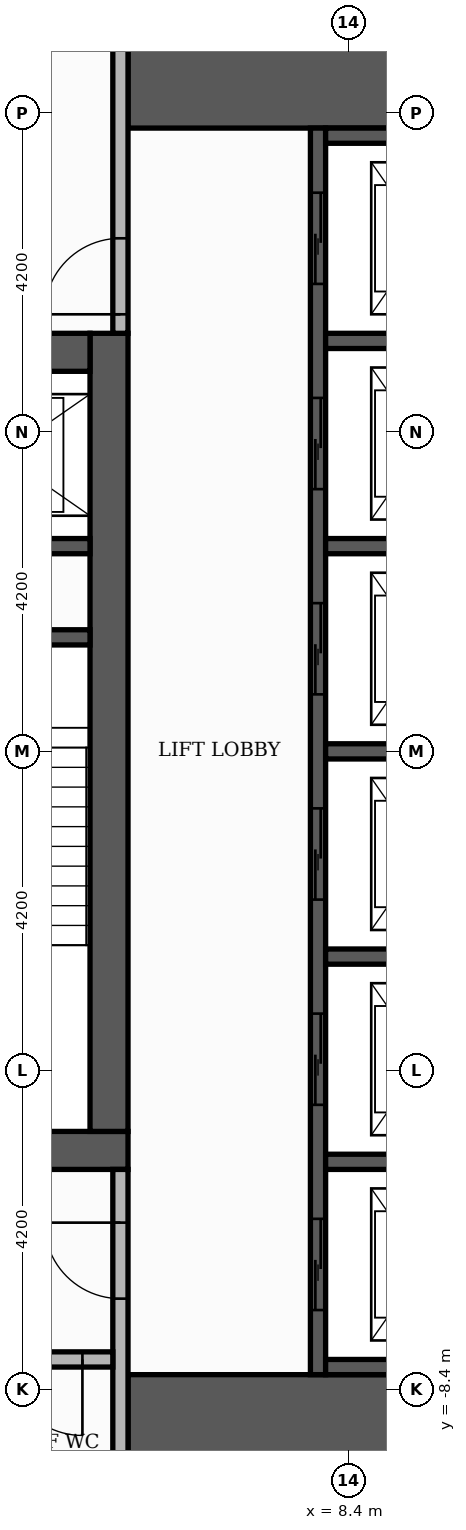
"""IFC4 building model, lengths in metres.
Left out: names, types, materials, properties, quantities, classifications, styles, units other than length and angle.
Written with IfcOpenShell. Run it as: python <this file> out.ifc"""

import sys

from ifc_helpers import new_model, si_unit, direction, frame, frame_2d, origin, place, context, subcontext, project, spatial, rectangle, extrude, element, fill, save


model = new_model("IFC4")
c1 = context("Model", 3, precision=1e-05, world=origin(), true_north=direction((0.0, 1.0)))
c2 = subcontext(c1, "Body", "Model", "MODEL_VIEW")
j1 = project(units=[si_unit("LENGTHUNIT", "METRE"), si_unit("PLANEANGLEUNIT", "RADIAN")], contexts=[c1])
p1 = place(None, origin())
s1 = spatial("IfcSite", under=j1, at=p1, CompositionType="ELEMENT")
p2 = place(p1, origin())
s2 = spatial("IfcBuilding", under=s1, at=p2, CompositionType="ELEMENT")
p3 = place(p2, frame((0.0, 0.0, 157.2)))
s3 = spatial("IfcBuildingStorey", under=s2, at=p3, CompositionType="ELEMENT", Elevation=157.2)
p4 = place(p3, frame((-5.5, -5.25, 0.0), z_axis=(0.0, 0.0, 1.0), x_axis=(1.0, 0.0, 0.0)))
e1 = element("IfcWall", 1, at=p4, inside=s3, PredefinedType="SHEAR", context=c2, shape_type="SweptSolid", body=[
    extrude(rectangle(XDim=11.0, YDim=0.5, at=frame_2d((5.5, 0.0))), origin(), (0.0, 0.0, 1.0), 3.48),
])
p5 = place(p4, frame((4.9, 0.0, 0.0)))
e2 = element("IfcOpeningElement", 2, at=p5, cuts=e1, PredefinedType="OPENING", context=c2, shape_type="SweptSolid", body=[
    extrude(rectangle(XDim=1.2, YDim=2.1, at=frame_2d((0.6, 1.05))), frame((0.0, 0.26, 0.0), z_axis=(0.0, -1.0, 0.0), x_axis=(1.0, 0.0, 0.0)), (0.0, 0.0, 1.0), 0.52),
])
p6 = place(p3, frame((5.25, -5.0, 0.0), z_axis=(0.0, 0.0, 1.0), x_axis=(0.0, 1.0, 0.0)))
e3 = element("IfcWall", 3, at=p6, inside=s3, PredefinedType="SHEAR", context=c2, shape_type="SweptSolid", body=[
    extrude(rectangle(XDim=10.5, YDim=0.5, at=frame_2d((5.25, 0.0))), origin(), (0.0, 0.0, 1.0), 3.48),
])
p7 = place(p3, frame((-5.0, 5.25, 0.0), z_axis=(0.0, 0.0, 1.0), x_axis=(1.0, 0.0, 0.0)))
e4 = element("IfcWall", 4, at=p7, inside=s3, PredefinedType="SHEAR", context=c2, shape_type="SweptSolid", body=[
    extrude(rectangle(XDim=10.0, YDim=0.5, at=frame_2d((5.0, 0.0))), origin(), (0.0, 0.0, 1.0), 3.48),
])
p8 = place(p7, frame((4.4, 0.0, 0.0)))
e5 = element("IfcOpeningElement", 5, at=p8, cuts=e4, PredefinedType="OPENING", context=c2, shape_type="SweptSolid", body=[
    extrude(rectangle(XDim=1.2, YDim=2.1, at=frame_2d((0.6, 1.05))), frame((0.0, 0.26, 0.0), z_axis=(0.0, -1.0, 0.0), x_axis=(1.0, 0.0, 0.0)), (0.0, 0.0, 1.0), 0.52),
])
for number, where, z_axis, x_axis in (
    (6, (5.5, -9.15, 0.0), (0.0, 0.0, 1.0), (1.0, 0.0, 0.0)),
    (7, (5.5, 9.15, 0.0), (0.0, 0.0, 1.0), (1.0, 0.0, 0.0)),
):
    element("IfcWall", number, at=place(p3, frame(where, z_axis=z_axis, x_axis=x_axis)), inside=s3, PredefinedType="SHEAR", context=c2, shape_type="SweptSolid", body=[
        extrude(rectangle(XDim=4.6, YDim=1.9, at=frame_2d((2.3, 0.0))), origin(), (0.0, 0.0, 1.0), 3.48),
    ])
p9 = place(p3, frame((2.15, 1.5, 0.0), z_axis=(0.0, 0.0, 1.0), x_axis=(1.0, 0.0, 0.0)))
e8 = element("IfcWall", 8, at=p9, inside=s3, PredefinedType="SHEAR", context=c2, shape_type="SweptSolid", body=[
    extrude(rectangle(XDim=2.85, YDim=0.2, at=frame_2d((1.425, 0.0))), origin(), (0.0, 0.0, 1.0), 3.48),
])
p10 = place(p3, frame((8.0, -8.2, 0.0), z_axis=(0.0, 0.0, 1.0), x_axis=(0.0, 1.0, 0.0)))
e9 = element("IfcWall", 9, at=p10, inside=s3, PredefinedType="SHEAR", context=c2, shape_type="SweptSolid", body=[
    extrude(rectangle(XDim=16.4, YDim=0.2, at=frame_2d((8.2, 0.0))), origin(), (0.0, 0.0, 1.0), 3.48),
])
p11 = place(p10, frame((0.85, 0.0, 0.0)))
e10 = element("IfcOpeningElement", 10, at=p11, cuts=e9, PredefinedType="OPENING", context=c2, shape_type="SweptSolid", body=[
    extrude(rectangle(XDim=1.2, YDim=2.1, at=frame_2d((0.6, 1.05))), frame((0.0, 0.11, 0.0), z_axis=(0.0, -1.0, 0.0), x_axis=(1.0, 0.0, 0.0)), (0.0, 0.0, 1.0), 0.22),
])
p12 = place(p10, frame((3.55, 0.0, 0.0)))
e11 = element("IfcOpeningElement", 11, at=p12, cuts=e9, PredefinedType="OPENING", context=c2, shape_type="SweptSolid", body=[
    extrude(rectangle(XDim=1.2, YDim=2.1, at=frame_2d((0.6, 1.05))), frame((0.0, 0.11, 0.0), z_axis=(0.0, -1.0, 0.0), x_axis=(1.0, 0.0, 0.0)), (0.0, 0.0, 1.0), 0.22),
])
p13 = place(p10, frame((6.25, 0.0, 0.0)))
e12 = element("IfcOpeningElement", 12, at=p13, cuts=e9, PredefinedType="OPENING", context=c2, shape_type="SweptSolid", body=[
    extrude(rectangle(XDim=1.2, YDim=2.1, at=frame_2d((0.6, 1.05))), frame((0.0, 0.11, 0.0), z_axis=(0.0, -1.0, 0.0), x_axis=(1.0, 0.0, 0.0)), (0.0, 0.0, 1.0), 0.22),
])
p14 = place(p10, frame((8.95, 0.0, 0.0)))
e13 = element("IfcOpeningElement", 13, at=p14, cuts=e9, PredefinedType="OPENING", context=c2, shape_type="SweptSolid", body=[
    extrude(rectangle(XDim=1.2, YDim=2.1, at=frame_2d((0.6, 1.05))), frame((0.0, 0.11, 0.0), z_axis=(0.0, -1.0, 0.0), x_axis=(1.0, 0.0, 0.0)), (0.0, 0.0, 1.0), 0.22),
])
p15 = place(p10, frame((11.65, 0.0, 0.0)))
e14 = element("IfcOpeningElement", 14, at=p15, cuts=e9, PredefinedType="OPENING", context=c2, shape_type="SweptSolid", body=[
    extrude(rectangle(XDim=1.2, YDim=2.1, at=frame_2d((0.6, 1.05))), frame((0.0, 0.11, 0.0), z_axis=(0.0, -1.0, 0.0), x_axis=(1.0, 0.0, 0.0)), (0.0, 0.0, 1.0), 0.22),
])
p16 = place(p10, frame((14.35, 0.0, 0.0)))
e15 = element("IfcOpeningElement", 15, at=p16, cuts=e9, PredefinedType="OPENING", context=c2, shape_type="SweptSolid", body=[
    extrude(rectangle(XDim=1.2, YDim=2.1, at=frame_2d((0.6, 1.05))), frame((0.0, 0.11, 0.0), z_axis=(0.0, -1.0, 0.0), x_axis=(1.0, 0.0, 0.0)), (0.0, 0.0, 1.0), 0.22),
])
for number, where, z_axis, x_axis in (
    (16, (8.1, -8.1, 0.0), (0.0, 0.0, 1.0), (1.0, 0.0, 0.0)),
    (17, (8.1, -5.4, 0.0), (0.0, 0.0, 1.0), (1.0, 0.0, 0.0)),
    (18, (8.1, -2.7, 0.0), (0.0, 0.0, 1.0), (1.0, 0.0, 0.0)),
    (19, (8.1, 0.0, 0.0), (0.0, 0.0, 1.0), (1.0, 0.0, 0.0)),
):
    element("IfcWall", number, at=place(p3, frame(where, z_axis=z_axis, x_axis=x_axis)), inside=s3, PredefinedType="SHEAR", context=c2, shape_type="SweptSolid", body=[
        extrude(rectangle(XDim=2.0, YDim=0.2, at=frame_2d((1.0, 0.0))), origin(), (0.0, 0.0, 1.0), 3.48),
    ])
p17 = place(p3, frame((2.15, 2.7, 0.0), z_axis=(0.0, 0.0, 1.0), x_axis=(1.0, 0.0, 0.0)))
e20 = element("IfcWall", 20, at=p17, inside=s3, PredefinedType="SHEAR", context=c2, shape_type="SweptSolid", body=[
    extrude(rectangle(XDim=2.85, YDim=0.2, at=frame_2d((1.425, 0.0))), origin(), (0.0, 0.0, 1.0), 3.48),
])
for number, where, z_axis, x_axis in (
    (21, (8.1, 2.7, 0.0), (0.0, 0.0, 1.0), (1.0, 0.0, 0.0)),
    (22, (8.1, 5.4, 0.0), (0.0, 0.0, 1.0), (1.0, 0.0, 0.0)),
    (23, (8.1, 8.1, 0.0), (0.0, 0.0, 1.0), (1.0, 0.0, 0.0)),
):
    element("IfcWall", number, at=place(p3, frame(where, z_axis=z_axis, x_axis=x_axis)), inside=s3, PredefinedType="SHEAR", context=c2, shape_type="SweptSolid", body=[
        extrude(rectangle(XDim=2.0, YDim=0.2, at=frame_2d((1.0, 0.0))), origin(), (0.0, 0.0, 1.0), 3.48),
    ])
p18 = place(p3, frame((5.4, -10.1, 0.0), z_axis=(0.0, 0.0, 1.0), x_axis=(0.0, 1.0, 0.0)))
e24 = element("IfcWall", 24, at=p18, inside=s3, PredefinedType="PARTITIONING", context=c2, shape_type="SweptSolid", body=[
    extrude(rectangle(XDim=4.6, YDim=0.2, at=frame_2d((2.3, 0.0))), origin(), (0.0, 0.0, 1.0), 3.48),
])
p19 = place(p18, frame((2.9, 0.0, 0.0)))
e25 = element("IfcOpeningElement", 25, at=p19, cuts=e24, PredefinedType="OPENING", context=c2, shape_type="SweptSolid", body=[
    extrude(rectangle(XDim=1.0, YDim=2.1, at=frame_2d((0.5, 1.05))), frame((0.0, 0.11, 0.0), z_axis=(0.0, -1.0, 0.0), x_axis=(1.0, 0.0, 0.0)), (0.0, 0.0, 1.0), 0.22),
])
p20 = place(p3, frame((3.55, -8.0, 0.0), z_axis=(0.0, 0.0, 1.0), x_axis=(1.0, 0.0, 0.0)))
e26 = element("IfcWall", 26, at=p20, inside=s3, PredefinedType="PARTITIONING", context=c2, shape_type="SweptSolid", body=[
    extrude(rectangle(XDim=1.75, YDim=0.2, at=frame_2d((0.875, 0.0))), origin(), (0.0, 0.0, 1.0), 3.48),
])
p21 = place(p20, frame((0.35, 0.0, 0.0)))
e27 = element("IfcOpeningElement", 27, at=p21, cuts=e26, PredefinedType="OPENING", context=c2, shape_type="SweptSolid", body=[
    extrude(rectangle(XDim=1.0, YDim=2.1, at=frame_2d((0.5, 1.05))), frame((0.0, 0.11, 0.0), z_axis=(0.0, -1.0, 0.0), x_axis=(1.0, 0.0, 0.0)), (0.0, 0.0, 1.0), 0.22),
])
p22 = place(p3, frame((5.4, 5.5, 0.0), z_axis=(0.0, 0.0, 1.0), x_axis=(0.0, 1.0, 0.0)))
e28 = element("IfcWall", 28, at=p22, inside=s3, PredefinedType="PARTITIONING", context=c2, shape_type="SweptSolid", body=[
    extrude(rectangle(XDim=4.6, YDim=0.2, at=frame_2d((2.3, 0.0))), origin(), (0.0, 0.0, 1.0), 3.48),
])
p23 = place(p22, frame((0.25, 0.0, 0.0)))
e29 = element("IfcOpeningElement", 29, at=p23, cuts=e28, PredefinedType="OPENING", context=c2, shape_type="SweptSolid", body=[
    extrude(rectangle(XDim=1.0, YDim=2.1, at=frame_2d((0.5, 1.05))), frame((0.0, 0.11, 0.0), z_axis=(0.0, -1.0, 0.0), x_axis=(1.0, 0.0, 0.0)), (0.0, 0.0, 1.0), 0.22),
])
p24 = place(p11, origin())
e30 = element("IfcDoor", 30, at=p24, inside=s3, OperationType="SLIDING_TO_LEFT", PredefinedType="DOOR", context=c2, shape_type="SweptSolid", body=[
    extrude(rectangle(XDim=1.2, YDim=2.1, at=frame_2d((0.6, 1.05))), frame((0.0, 0.025, 0.0), z_axis=(0.0, -1.0, 0.0), x_axis=(1.0, 0.0, 0.0)), (0.0, 0.0, 1.0), 0.05),
])
fill(e10, e30)
p25 = place(p12, origin())
e31 = element("IfcDoor", 31, at=p25, inside=s3, OperationType="SLIDING_TO_LEFT", PredefinedType="DOOR", context=c2, shape_type="SweptSolid", body=[
    extrude(rectangle(XDim=1.2, YDim=2.1, at=frame_2d((0.6, 1.05))), frame((0.0, 0.025, 0.0), z_axis=(0.0, -1.0, 0.0), x_axis=(1.0, 0.0, 0.0)), (0.0, 0.0, 1.0), 0.05),
])
fill(e11, e31)
p26 = place(p13, origin())
e32 = element("IfcDoor", 32, at=p26, inside=s3, OperationType="SLIDING_TO_LEFT", PredefinedType="DOOR", context=c2, shape_type="SweptSolid", body=[
    extrude(rectangle(XDim=1.2, YDim=2.1, at=frame_2d((0.6, 1.05))), frame((0.0, 0.025, 0.0), z_axis=(0.0, -1.0, 0.0), x_axis=(1.0, 0.0, 0.0)), (0.0, 0.0, 1.0), 0.05),
])
fill(e12, e32)
p27 = place(p14, origin())
e33 = element("IfcDoor", 33, at=p27, inside=s3, OperationType="SLIDING_TO_LEFT", PredefinedType="DOOR", context=c2, shape_type="SweptSolid", body=[
    extrude(rectangle(XDim=1.2, YDim=2.1, at=frame_2d((0.6, 1.05))), frame((0.0, 0.025, 0.0), z_axis=(0.0, -1.0, 0.0), x_axis=(1.0, 0.0, 0.0)), (0.0, 0.0, 1.0), 0.05),
])
fill(e13, e33)
p28 = place(p15, origin())
e34 = element("IfcDoor", 34, at=p28, inside=s3, OperationType="SLIDING_TO_LEFT", PredefinedType="DOOR", context=c2, shape_type="SweptSolid", body=[
    extrude(rectangle(XDim=1.2, YDim=2.1, at=frame_2d((0.6, 1.05))), frame((0.0, 0.025, 0.0), z_axis=(0.0, -1.0, 0.0), x_axis=(1.0, 0.0, 0.0)), (0.0, 0.0, 1.0), 0.05),
])
fill(e14, e34)
p29 = place(p16, origin())
e35 = element("IfcDoor", 35, at=p29, inside=s3, OperationType="SLIDING_TO_LEFT", PredefinedType="DOOR", context=c2, shape_type="SweptSolid", body=[
    extrude(rectangle(XDim=1.2, YDim=2.1, at=frame_2d((0.6, 1.05))), frame((0.0, 0.025, 0.0), z_axis=(0.0, -1.0, 0.0), x_axis=(1.0, 0.0, 0.0)), (0.0, 0.0, 1.0), 0.05),
])
fill(e15, e35)
p30 = place(p23, origin())
e36 = element("IfcDoor", 36, at=p30, inside=s3, OperationType="SINGLE_SWING_LEFT", PredefinedType="DOOR", context=c2, shape_type="SweptSolid", body=[
    extrude(rectangle(XDim=1.0, YDim=2.1, at=frame_2d((0.5, 1.05))), frame((0.0, 0.025, 0.0), z_axis=(0.0, -1.0, 0.0), x_axis=(1.0, 0.0, 0.0)), (0.0, 0.0, 1.0), 0.05),
])
fill(e29, e36)
p31 = place(p19, origin())
e37 = element("IfcDoor", 37, at=p31, inside=s3, OperationType="SINGLE_SWING_RIGHT", PredefinedType="DOOR", context=c2, shape_type="SweptSolid", body=[
    extrude(rectangle(XDim=1.0, YDim=2.1, at=frame_2d((0.5, 1.05))), frame((0.0, 0.025, 0.0), z_axis=(0.0, -1.0, 0.0), x_axis=(1.0, 0.0, 0.0)), (0.0, 0.0, 1.0), 0.05),
])
fill(e25, e37)
p32 = place(p21, frame((1.0, 0.0, 0.0), z_axis=(0.0, 0.0, 1.0), x_axis=(-1.0, 0.0, 0.0)))
e38 = element("IfcDoor", 38, at=p32, inside=s3, OperationType="SINGLE_SWING_RIGHT", PredefinedType="DOOR", context=c2, shape_type="SweptSolid", body=[
    extrude(rectangle(XDim=1.0, YDim=2.1, at=frame_2d((0.5, 1.05))), frame((0.0, 0.025, 0.0), z_axis=(0.0, -1.0, 0.0), x_axis=(1.0, 0.0, 0.0)), (0.0, 0.0, 1.0), 0.05),
])
fill(e27, e38)
save(model, sys.argv[1])
